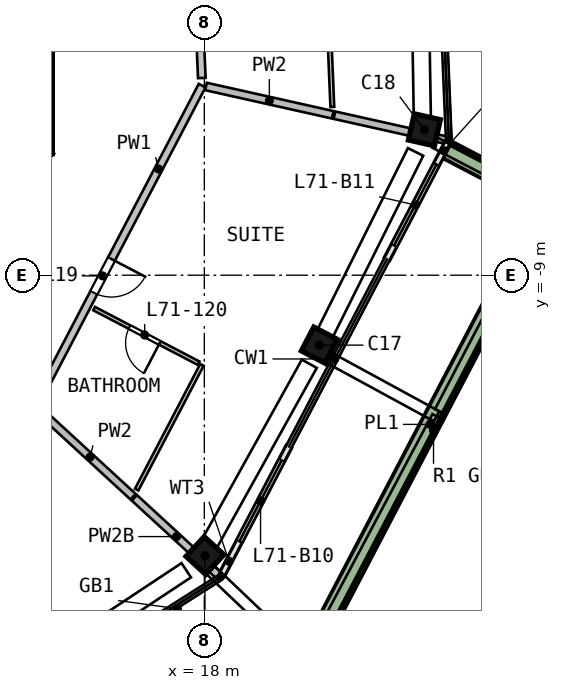
"""IFC4 building model, lengths in metres.
Left out: names, types, materials, properties, quantities, classifications, styles, units other than length and angle.
Written with IfcOpenShell. Run it as: python <this file> out.ifc"""

import sys

from ifc_helpers import new_model, si_unit, direction, frame, frame_2d, origin, origin_2d, place, context, subcontext, project, spatial, rectangle, extrude, element, fill, save


model = new_model("IFC4")
c1 = context("Model", 3, precision=1e-05, world=origin(), true_north=direction((0.0, 1.0)))
c2 = subcontext(c1, "Body", "Model", "MODEL_VIEW")
j1 = project(units=[si_unit("LENGTHUNIT", "METRE"), si_unit("PLANEANGLEUNIT", "RADIAN")], contexts=[c1])
p1 = place(None, origin())
s1 = spatial("IfcSite", under=j1, at=p1, CompositionType="ELEMENT")
p2 = place(p1, origin())
s2 = spatial("IfcBuilding", under=s1, at=p2, CompositionType="ELEMENT")
p3 = place(p2, frame((0.0, 0.0, 288.0)))
s3 = spatial("IfcBuildingStorey", under=s2, at=p3, CompositionType="ELEMENT", Elevation=288.0)
p4 = place(p3, frame((17.923, -16.481, 0.0), z_axis=(0.077616288, 0.085902454, 0.993275632), x_axis=(-0.672140187, -0.731317306, 0.115769454)))
e1 = element("IfcColumn", 1, at=p4, inside=s3, PredefinedType="COLUMN", context=c2, shape_type="SweptSolid", body=[
    extrude(rectangle(XDim=0.7, YDim=0.7, at=origin_2d()), origin(), (0.0, 0.0, 1.0), 3.211),
])
p5 = place(p3, frame((20.966, -10.961, 0.0), z_axis=(0.051332584, 0.100155575, 0.993646731), x_axis=(0.460700416, 0.880391875, -0.112540095)))
e2 = element("IfcColumn", 2, at=p5, inside=s3, PredefinedType="COLUMN", context=c2, shape_type="SweptSolid", body=[
    extrude(rectangle(XDim=0.7, YDim=0.7, at=origin_2d()), origin(), (0.0, 0.0, 1.0), 3.21),
])
p6 = place(p3, frame((23.762, -5.311, 0.0), z_axis=(0.024250371, 0.113193738, 0.993276949), x_axis=(-0.216314681, -0.969436955, 0.115758152)))
e3 = element("IfcColumn", 3, at=p6, inside=s3, PredefinedType="COLUMN", context=c2, shape_type="SweptSolid", body=[
    extrude(rectangle(XDim=0.7, YDim=0.7, at=origin_2d()), origin(), (0.0, 0.0, 1.0), 3.211),
])
p7 = place(p3, frame((18.466, -16.875, 0.0), z_axis=(0.0, 0.0, 1.0), x_axis=(0.4633106, 0.886195965, 0.0)))
e4 = element("IfcWall", 4, at=p7, inside=s3, PredefinedType="SOLIDWALL", context=c2, shape_type="SweptSolid", body=[
    extrude(rectangle(XDim=3.787, YDim=0.15, at=frame_2d((1.893, 0.0))), origin(), (0.0, 0.0, 1.0), 2.525),
])
p8 = place(p7, frame((0.987, 0.0, 0.0)))
e5 = element("IfcOpeningElement", 5, at=p8, cuts=e4, PredefinedType="OPENING", context=c2, shape_type="SweptSolid", body=[
    extrude(rectangle(XDim=2.4, YDim=2.4, at=frame_2d((1.2, 1.2))), frame((0.0, 0.085, 0.0), z_axis=(0.0, -1.0, 0.0), x_axis=(1.0, 0.0, 0.0)), (0.0, 0.0, 1.0), 0.17),
])
p9 = place(p3, frame((22.809, -8.569, 0.0), z_axis=(0.0, 0.0, 1.0), x_axis=(0.463242764, 0.886231427, 0.0)))
e6 = element("IfcWall", 6, at=p9, inside=s3, PredefinedType="SOLIDWALL", context=c2, shape_type="SweptSolid", body=[
    extrude(rectangle(XDim=3.427, YDim=0.15, at=frame_2d((1.713, 0.0))), origin(), (0.0, 0.0, 1.0), 2.525),
])
p10 = place(p9, frame((0.4, 0.0, 0.0)))
e7 = element("IfcOpeningElement", 7, at=p10, cuts=e6, PredefinedType="OPENING", context=c2, shape_type="SweptSolid", body=[
    extrude(rectangle(XDim=2.4, YDim=2.4, at=frame_2d((1.2, 1.2))), frame((0.0, 0.085, 0.0), z_axis=(0.0, -1.0, 0.0), x_axis=(1.0, 0.0, 0.0)), (0.0, 0.0, 1.0), 0.17),
])
p11 = place(p3, frame((20.766, -19.007, 0.0), z_axis=(0.0, 0.0, 1.0), x_axis=(0.463286917, 0.886208346, 0.0)))
e8 = element("IfcWall", 8, at=p11, inside=s3, PredefinedType="SOLIDWALL", context=c2, shape_type="SweptSolid", body=[
    extrude(rectangle(XDim=13.723, YDim=0.5, at=frame_2d((6.862, 0.0))), origin(), (0.0, 0.0, 1.0), 0.7),
])
p12 = place(p3, frame((26.786, -6.951, 0.0), z_axis=(0.0, 0.0, 1.0), x_axis=(-0.886194214, 0.463313949, 0.0)))
e9 = element("IfcWall", 9, at=p12, inside=s3, PredefinedType="SOLIDWALL", context=c2, shape_type="SweptSolid", body=[
    extrude(rectangle(XDim=2.699, YDim=0.5, at=frame_2d((1.35, 0.0))), origin(), (0.0, 0.0, 1.0), 0.7),
])
p13 = place(p3, frame((17.942, -4.01, 0.0), z_axis=(0.0, 0.0, 1.0), x_axis=(-0.46328321, -0.886210284, 0.0)))
e10 = element("IfcWall", 10, at=p13, inside=s3, PredefinedType="SOLIDWALL", context=c2, shape_type="SweptSolid", body=[
    extrude(rectangle(XDim=9.316, YDim=0.2, at=frame_2d((4.658, 0.0))), origin(), (0.0, 0.0, 1.0), 3.19),
])
p14 = place(p13, frame((5.15, 0.0, 0.0)))
e11 = element("IfcOpeningElement", 11, at=p14, cuts=e10, PredefinedType="OPENING", context=c2, shape_type="SweptSolid", body=[
    extrude(rectangle(XDim=1.0, YDim=2.1, at=frame_2d((0.5, 1.05))), frame((0.0, 0.11, 0.0), z_axis=(0.0, -1.0, 0.0), x_axis=(1.0, 0.0, 0.0)), (0.0, 0.0, 1.0), 0.22),
])
p15 = place(p3, frame((17.543, 5.498, 0.0), z_axis=(0.0, 0.0, 1.0), x_axis=(0.041874694, -0.99912287, 0.0)))
e12 = element("IfcWall", 12, at=p15, inside=s3, PredefinedType="SOLIDWALL", context=c2, shape_type="SweptSolid", body=[
    extrude(rectangle(XDim=9.317, YDim=0.2, at=frame_2d((4.658, 0.0))), origin(), (0.0, 0.0, 1.0), 3.19),
])
p16 = place(p15, frame((1.9, 0.0, 0.0)))
e13 = element("IfcOpeningElement", 13, at=p16, cuts=e12, PredefinedType="OPENING", context=c2, shape_type="SweptSolid", body=[
    extrude(rectangle(XDim=1.0, YDim=2.1, at=frame_2d((0.5, 1.05))), frame((0.0, 0.11, 0.0), z_axis=(0.0, -1.0, 0.0), x_axis=(1.0, 0.0, 0.0)), (0.0, 0.0, 1.0), 0.22),
])
p17 = place(p3, frame((13.862, -12.747, 0.0), z_axis=(0.0, 0.0, 1.0), x_axis=(0.736105078, -0.67686728, 0.0)))
e14 = element("IfcWall", 14, at=p17, inside=s3, PredefinedType="SOLIDWALL", context=c2, shape_type="SweptSolid", body=[
    extrude(rectangle(XDim=3.074, YDim=0.2, at=frame_2d((1.537, 0.0))), origin(), (0.0, 0.0, 1.0), 3.19),
])
p18 = place(p3, frame((16.159, -14.859, 0.0), z_axis=(0.0, 0.0, 1.0), x_axis=(0.736116799, -0.676854533, 0.0)))
e15 = element("IfcWall", 15, at=p18, inside=s3, PredefinedType="SOLIDWALL", context=c2, shape_type="SweptSolid", body=[
    extrude(rectangle(XDim=3.011, YDim=0.2, at=frame_2d((1.506, 0.0))), origin(), (0.0, 0.0, 1.0), 2.69),
])
p19 = place(p3, frame((18.043, -4.033, 0.0), z_axis=(0.0, 0.0, 1.0), x_axis=(0.975920804, -0.218125156, 0.0)))
e16 = element("IfcWall", 16, at=p19, inside=s3, PredefinedType="SOLIDWALL", context=c2, shape_type="SweptSolid", body=[
    extrude(rectangle(XDim=3.418, YDim=0.2, at=frame_2d((1.709, 0.0))), origin(), (0.0, 0.0, 1.0), 3.19),
])
p20 = place(p3, frame((21.424, -4.789, 0.0), z_axis=(0.0, 0.0, 1.0), x_axis=(0.975909655, -0.218175034, 0.0)))
e17 = element("IfcWall", 17, at=p20, inside=s3, PredefinedType="SOLIDWALL", context=c2, shape_type="SweptSolid", body=[
    extrude(rectangle(XDim=3.011, YDim=0.2, at=frame_2d((1.506, 0.0))), origin(), (0.0, 0.0, 1.0), 3.19),
])
p21 = place(p3, frame((17.847, -11.314, 0.0), z_axis=(0.0, 0.0, 1.0), x_axis=(-0.886233527, 0.463238746, 0.0)))
e18 = element("IfcWall", 18, at=p21, inside=s3, PredefinedType="PARTITIONING", context=c2, shape_type="SweptSolid", body=[
    extrude(rectangle(XDim=3.1, YDim=0.1, at=frame_2d((1.55, 0.0))), origin(), (0.0, 0.0, 1.0), 3.19),
])
p22 = place(p21, frame((1.15, 0.0, 0.0)))
e19 = element("IfcOpeningElement", 19, at=p22, cuts=e18, PredefinedType="OPENING", context=c2, shape_type="SweptSolid", body=[
    extrude(rectangle(XDim=0.9, YDim=2.1, at=frame_2d((0.45, 1.05))), frame((0.0, 0.06, 0.0), z_axis=(0.0, -1.0, 0.0), x_axis=(1.0, 0.0, 0.0)), (0.0, 0.0, 1.0), 0.12),
])
p23 = place(p3, frame((17.936, -11.361, 0.0), z_axis=(0.0, 0.0, 1.0), x_axis=(-0.463302447, -0.886200227, 0.0)))
e20 = element("IfcWall", 20, at=p23, inside=s3, PredefinedType="PARTITIONING", context=c2, shape_type="SweptSolid", body=[
    extrude(rectangle(XDim=3.704, YDim=0.1, at=frame_2d((1.852, 0.0))), origin(), (0.0, 0.0, 1.0), 3.19),
])
p24 = place(p3, frame((21.368, -4.572, 0.0), z_axis=(0.0, 0.0, 1.0), x_axis=(-0.041855359, 0.99912368, 0.0)))
e21 = element("IfcWall", 21, at=p24, inside=s3, PredefinedType="PARTITIONING", context=c2, shape_type="SweptSolid", body=[
    extrude(rectangle(XDim=3.704, YDim=0.1, at=frame_2d((1.852, 0.0))), origin(), (0.0, 0.0, 1.0), 3.19),
])
p25 = place(p8, origin())
e22 = element("IfcDoor", 22, at=p25, inside=s3, OperationType="SLIDING_TO_LEFT", PredefinedType="DOOR", context=c2, shape_type="SweptSolid", body=[
    extrude(rectangle(XDim=2.4, YDim=2.4, at=frame_2d((1.2, 1.2))), frame((0.0, 0.025, 0.0), z_axis=(0.0, -1.0, 0.0), x_axis=(1.0, 0.0, 0.0)), (0.0, 0.0, 1.0), 0.05),
])
fill(e5, e22)
p26 = place(p10, origin())
e23 = element("IfcDoor", 23, at=p26, inside=s3, OperationType="SLIDING_TO_RIGHT", PredefinedType="DOOR", context=c2, shape_type="SweptSolid", body=[
    extrude(rectangle(XDim=2.4, YDim=2.4, at=frame_2d((1.2, 1.2))), frame((0.0, 0.025, 0.0), z_axis=(0.0, -1.0, 0.0), x_axis=(1.0, 0.0, 0.0)), (0.0, 0.0, 1.0), 0.05),
])
fill(e7, e23)
p27 = place(p14, origin())
e24 = element("IfcDoor", 24, at=p27, inside=s3, OperationType="SINGLE_SWING_LEFT", PredefinedType="DOOR", context=c2, shape_type="SweptSolid", body=[
    extrude(rectangle(XDim=1.0, YDim=2.1, at=frame_2d((0.5, 1.05))), frame((0.0, 0.025, 0.0), z_axis=(0.0, -1.0, 0.0), x_axis=(1.0, 0.0, 0.0)), (0.0, 0.0, 1.0), 0.05),
])
fill(e11, e24)
p28 = place(p22, origin())
e25 = element("IfcDoor", 25, at=p28, inside=s3, OperationType="SINGLE_SWING_LEFT", PredefinedType="DOOR", context=c2, shape_type="SweptSolid", body=[
    extrude(rectangle(XDim=0.9, YDim=2.1, at=frame_2d((0.45, 1.05))), frame((0.0, 0.025, 0.0), z_axis=(0.0, -1.0, 0.0), x_axis=(1.0, 0.0, 0.0)), (0.0, 0.0, 1.0), 0.05),
])
fill(e19, e25)
save(model, sys.argv[1])
